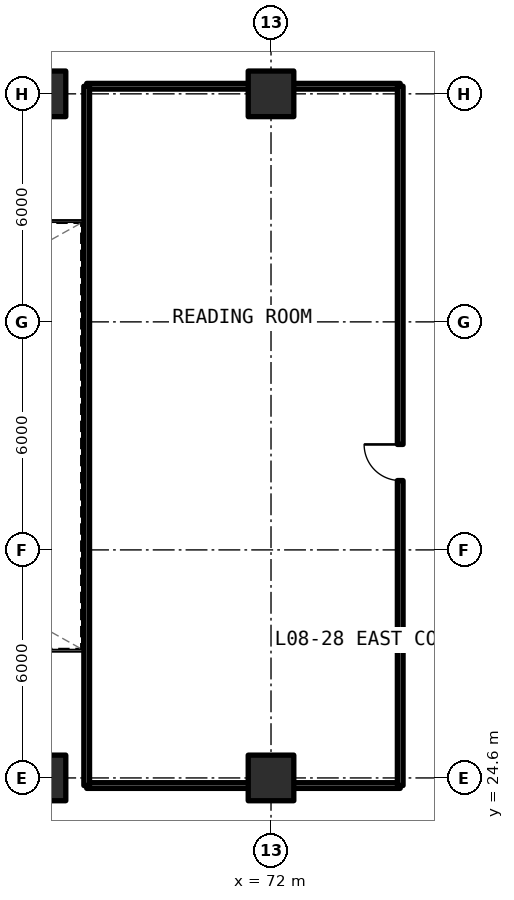
"""IFC4 building model, lengths in metres.
Left out: names, types, materials, properties, quantities, classifications, styles, units other than length and angle.
Written with IfcOpenShell. Run it as: python <this file> out.ifc"""

import sys

from ifc_helpers import new_model, si_unit, direction, frame, frame_2d, origin, origin_2d, place, context, subcontext, project, spatial, rectangle, extrude, element, fill, save


model = new_model("IFC4")
c1 = context("Model", 3, precision=1e-05, world=origin(), true_north=direction((0.0, 1.0)))
c2 = subcontext(c1, "Body", "Model", "MODEL_VIEW")
j1 = project(units=[si_unit("LENGTHUNIT", "METRE"), si_unit("PLANEANGLEUNIT", "RADIAN")], contexts=[c1])
p1 = place(None, origin())
s1 = spatial("IfcSite", under=j1, at=p1, CompositionType="ELEMENT")
p2 = place(p1, origin())
s2 = spatial("IfcBuilding", under=s1, at=p2, CompositionType="ELEMENT")
p3 = place(p2, frame((0.0, 0.0, 32.34)))
s3 = spatial("IfcBuildingStorey", under=s2, at=p3, CompositionType="ELEMENT", Elevation=32.34)
for number, where, z_axis, x_axis in (
    (1, (66.0, 24.6, 0.0), (0.0, 0.0, 1.0), (1.0, 0.0, 0.0)),
    (2, (66.0, 42.6, 0.0), (0.0, 0.0, 1.0), (1.0, 0.0, 0.0)),
    (3, (72.0, 24.6, 0.0), (0.0, 0.0, 1.0), (1.0, 0.0, 0.0)),
    (4, (72.0, 42.6, 0.0), (0.0, 0.0, 1.0), (1.0, 0.0, 0.0)),
):
    element("IfcColumn", number, at=place(p3, frame(where, z_axis=z_axis, x_axis=x_axis)), inside=s3, PredefinedType="COLUMN", context=c2, shape_type="SweptSolid", body=[
        extrude(rectangle(XDim=1.2, YDim=1.2, at=origin_2d()), origin(), (0.0, 0.0, 1.0), 3.3),
    ])
for number, where, z_axis, x_axis in (
    (5, (67.15, 24.4, 0.0), (0.0, 0.0, 1.0), (1.0, 0.0, 0.0)),
    (6, (67.15, 42.8, 0.0), (0.0, 0.0, 1.0), (1.0, 0.0, 0.0)),
):
    element("IfcWall", number, at=place(p3, frame(where, z_axis=z_axis, x_axis=x_axis)), inside=s3, PredefinedType="SOLIDWALL", context=c2, shape_type="SweptSolid", body=[
        extrude(rectangle(XDim=8.25, YDim=0.15, at=frame_2d((4.125, 0.0))), origin(), (0.0, 0.0, 1.0), 2.295),
    ])
p4 = place(p3, frame((67.15, 24.4, 0.0), z_axis=(0.0, 0.0, 1.0), x_axis=(0.0, 1.0, 0.0)))
e7 = element("IfcWall", 7, at=p4, inside=s3, PredefinedType="SOLIDWALL", context=c2, shape_type="SweptSolid", body=[
    extrude(rectangle(XDim=18.4, YDim=0.15, at=frame_2d((9.2, 0.0))), origin(), (0.0, 0.0, 1.0), 2.35),
])
p5 = place(p3, frame((75.4, 24.4, 0.0), z_axis=(0.0, 0.0, 1.0), x_axis=(0.0, 1.0, 0.0)))
e8 = element("IfcWall", 8, at=p5, inside=s3, PredefinedType="SOLIDWALL", context=c2, shape_type="SweptSolid", body=[
    extrude(rectangle(XDim=18.4, YDim=0.15, at=frame_2d((9.2, 0.0))), origin(), (0.0, 0.0, 1.0), 2.35),
])
p6 = place(p5, frame((8.025, 0.0, 0.0)))
e9 = element("IfcOpeningElement", 9, at=p6, cuts=e8, PredefinedType="OPENING", context=c2, shape_type="SweptSolid", body=[
    extrude(rectangle(XDim=0.95, YDim=2.15, at=frame_2d((0.475, 1.075))), frame((0.0, 0.085, 0.0), z_axis=(0.0, -1.0, 0.0), x_axis=(1.0, 0.0, 0.0)), (0.0, 0.0, 1.0), 0.17),
])
p7 = place(p6, origin())
e10 = element("IfcDoor", 10, at=p7, inside=s3, OperationType="SINGLE_SWING_RIGHT", PredefinedType="DOOR", context=c2, shape_type="SweptSolid", body=[
    extrude(rectangle(XDim=0.95, YDim=2.15, at=frame_2d((0.475, 1.075))), frame((0.0, 0.025, 0.0), z_axis=(0.0, -1.0, 0.0), x_axis=(1.0, 0.0, 0.0)), (0.0, 0.0, 1.0), 0.05),
])
fill(e9, e10)
save(model, sys.argv[1])
